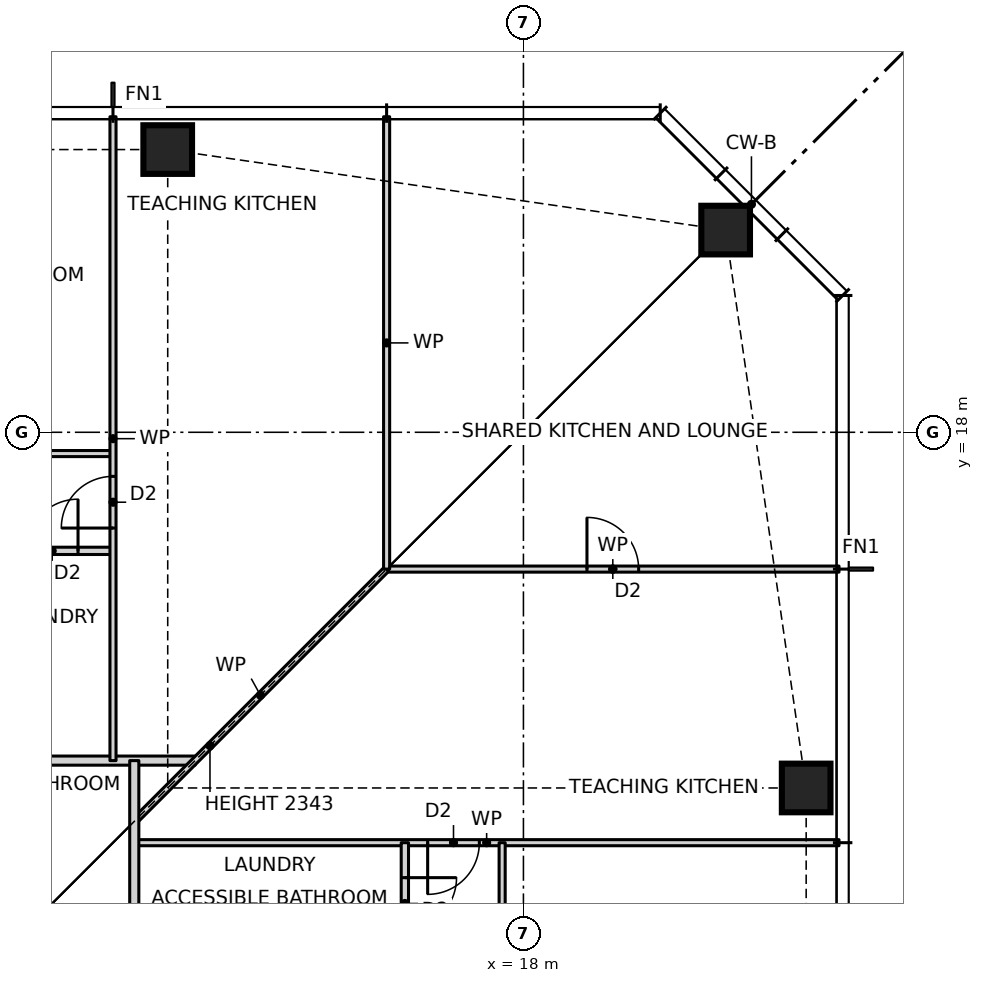
"""IFC4 building model, lengths in metres.
Left out: names, types, materials, properties, quantities, classifications, styles, units other than length and angle.
Written with IfcOpenShell. Run it as: python <this file> out.ifc"""

import sys

from ifc_helpers import new_model, si_unit, direction, frame, frame_2d, origin, origin_2d, place, context, subcontext, project, spatial, rectangle, hollow_rectangle, extrude, element, fill, save


model = new_model("IFC4")
c1 = context("Model", 3, precision=1e-05, world=origin(), true_north=direction((0.0, 1.0)))
c2 = subcontext(c1, "Body", "Model", "MODEL_VIEW")
j1 = project(units=[si_unit("LENGTHUNIT", "METRE"), si_unit("PLANEANGLEUNIT", "RADIAN")], contexts=[c1])
p1 = place(None, origin())
s1 = spatial("IfcSite", under=j1, at=p1, CompositionType="ELEMENT")
p2 = place(p1, origin())
s2 = spatial("IfcBuilding", under=s1, at=p2, CompositionType="ELEMENT")
p3 = place(p2, frame((0.0, 0.0, 57.0)))
s3 = spatial("IfcBuildingStorey", under=s2, at=p3, CompositionType="ELEMENT", Elevation=57.0)
for number, where, z_axis, x_axis in (
    (1, (22.65, 12.15, 0.0), (0.0, 0.0, 1.0), (1.0, 0.0, 0.0)),
    (2, (21.326, 21.326, 0.0), (0.0, 0.0, 1.0), (1.0, 0.0, 0.0)),
    (3, (12.15, 22.65, 0.0), (0.0, 0.0, 1.0), (1.0, 0.0, 0.0)),
):
    element("IfcColumn", number, at=place(p3, frame(where, z_axis=z_axis, x_axis=x_axis)), inside=s3, PredefinedType="COLUMN", context=c2, shape_type="SweptSolid", body=[
        extrude(hollow_rectangle(XDim=0.8, YDim=0.8, WallThickness=0.09, at=origin_2d()), origin(), (0.0, 0.0, 1.0), 3.5),
    ])
p4 = place(p3, frame((11.6, 11.25, 0.0), z_axis=(0.0, 0.0, 1.0), x_axis=(1.0, 0.0, 0.0)))
e4 = element("IfcWall", 4, at=p4, inside=s3, PredefinedType="PARTITIONING", context=c2, shape_type="SweptSolid", body=[
    extrude(rectangle(XDim=11.59, YDim=0.1, at=frame_2d((5.795, 0.0))), origin(), (0.0, 0.0, 1.0), 3.27),
])
p5 = place(p4, frame((4.825, 0.0, 0.0)))
e5 = element("IfcOpeningElement", 5, at=p5, cuts=e4, PredefinedType="OPENING", context=c2, shape_type="SweptSolid", body=[
    extrude(rectangle(XDim=0.85, YDim=2.1, at=frame_2d((0.425, 1.05))), frame((0.0, 0.06, 0.0), z_axis=(0.0, -1.0, 0.0), x_axis=(1.0, 0.0, 0.0)), (0.0, 0.0, 1.0), 0.12),
])
p6 = place(p3, frame((-12.6, 12.6, 0.0), z_axis=(0.0, 0.0, 1.0), x_axis=(1.0, 0.0, 0.0)))
e6 = element("IfcWall", 6, at=p6, inside=s3, PredefinedType="PARTITIONING", context=c2, shape_type="SweptSolid", body=[
    extrude(rectangle(XDim=25.2, YDim=0.15, at=frame_2d((12.6, 0.0))), origin(), (0.0, 0.0, 1.0), 3.27),
])
p7 = place(p6, frame((11.505, 0.0, 0.0)))
e7 = element("IfcOpeningElement", 7, at=p7, cuts=e6, PredefinedType="OPENING", context=c2, shape_type="SweptSolid", body=[
    extrude(rectangle(XDim=1.0, YDim=2.1, at=frame_2d((0.5, 1.05))), frame((0.0, 0.085, 0.0), z_axis=(0.0, -1.0, 0.0), x_axis=(1.0, 0.0, 0.0)), (0.0, 0.0, 1.0), 0.17),
])
p8 = place(p3, frame((15.75, 15.75, 0.0), z_axis=(0.0, 0.0, 1.0), x_axis=(1.0, 0.0, 0.0)))
e8 = element("IfcWall", 8, at=p8, inside=s3, PredefinedType="PARTITIONING", context=c2, shape_type="SweptSolid", body=[
    extrude(rectangle(XDim=7.44, YDim=0.1, at=frame_2d((3.72, 0.0))), origin(), (0.0, 0.0, 1.0), 3.27),
])
p9 = place(p8, frame((3.295, 0.0, 0.0)))
e9 = element("IfcOpeningElement", 9, at=p9, cuts=e8, PredefinedType="OPENING", context=c2, shape_type="SweptSolid", body=[
    extrude(rectangle(XDim=0.85, YDim=2.1, at=frame_2d((0.425, 1.05))), frame((0.0, 0.06, 0.0), z_axis=(0.0, -1.0, 0.0), x_axis=(1.0, 0.0, 0.0)), (0.0, 0.0, 1.0), 0.12),
])
p10 = place(p3, frame((5.65, 16.05, 0.0), z_axis=(0.0, 0.0, 1.0), x_axis=(1.0, 0.0, 0.0)))
e10 = element("IfcWall", 10, at=p10, inside=s3, PredefinedType="PARTITIONING", context=c2, shape_type="SweptSolid", body=[
    extrude(rectangle(XDim=5.6, YDim=0.12, at=frame_2d((2.8, 0.0))), origin(), (0.0, 0.0, 1.0), 3.27),
])
p11 = place(p10, frame((4.175, 0.0, 0.0)))
e11 = element("IfcOpeningElement", 11, at=p11, cuts=e10, PredefinedType="OPENING", context=c2, shape_type="SweptSolid", body=[
    extrude(rectangle(XDim=0.85, YDim=2.1, at=frame_2d((0.425, 1.05))), frame((0.0, 0.07, 0.0), z_axis=(0.0, -1.0, 0.0), x_axis=(1.0, 0.0, 0.0)), (0.0, 0.0, 1.0), 0.14),
])
p12 = place(p10, frame((2.225, 0.0, 0.0)))
e12 = element("IfcOpeningElement", 12, at=p12, cuts=e10, PredefinedType="OPENING", context=c2, shape_type="SweptSolid", body=[
    extrude(rectangle(XDim=0.85, YDim=2.1, at=frame_2d((0.425, 1.05))), frame((0.0, 0.07, 0.0), z_axis=(0.0, -1.0, 0.0), x_axis=(1.0, 0.0, 0.0)), (0.0, 0.0, 1.0), 0.14),
])
p13 = place(p3, frame((-15.75, 17.65, 0.0), z_axis=(0.0, 0.0, 1.0), x_axis=(1.0, 0.0, 0.0)))
e13 = element("IfcWall", 13, at=p13, inside=s3, PredefinedType="PARTITIONING", context=c2, shape_type="SweptSolid", body=[
    extrude(rectangle(XDim=27.0, YDim=0.1, at=frame_2d((13.5, 0.0))), origin(), (0.0, 0.0, 1.0), 3.27),
])
p14 = place(p13, frame((24.3, 0.0, 0.0)))
e14 = element("IfcOpeningElement", 14, at=p14, cuts=e13, PredefinedType="OPENING", context=c2, shape_type="SweptSolid", body=[
    extrude(rectangle(XDim=0.9, YDim=2.1, at=frame_2d((0.45, 1.05))), frame((0.0, 0.06, 0.0), z_axis=(0.0, -1.0, 0.0), x_axis=(1.0, 0.0, 0.0)), (0.0, 0.0, 1.0), 0.12),
])
p15 = place(p13, frame((19.8, 0.0, 0.0)))
e15 = element("IfcOpeningElement", 15, at=p15, cuts=e13, PredefinedType="OPENING", context=c2, shape_type="SweptSolid", body=[
    extrude(rectangle(XDim=0.9, YDim=2.1, at=frame_2d((0.45, 1.05))), frame((0.0, 0.06, 0.0), z_axis=(0.0, -1.0, 0.0), x_axis=(1.0, 0.0, 0.0)), (0.0, 0.0, 1.0), 0.12),
])
p16 = place(p13, frame((15.3, 0.0, 0.0)))
e16 = element("IfcOpeningElement", 16, at=p16, cuts=e13, PredefinedType="OPENING", context=c2, shape_type="SweptSolid", body=[
    extrude(rectangle(XDim=0.9, YDim=2.1, at=frame_2d((0.45, 1.05))), frame((0.0, 0.06, 0.0), z_axis=(0.0, -1.0, 0.0), x_axis=(1.0, 0.0, 0.0)), (0.0, 0.0, 1.0), 0.12),
])
p17 = place(p13, frame((10.8, 0.0, 0.0)))
e17 = element("IfcOpeningElement", 17, at=p17, cuts=e13, PredefinedType="OPENING", context=c2, shape_type="SweptSolid", body=[
    extrude(rectangle(XDim=0.9, YDim=2.1, at=frame_2d((0.45, 1.05))), frame((0.0, 0.06, 0.0), z_axis=(0.0, -1.0, 0.0), x_axis=(1.0, 0.0, 0.0)), (0.0, 0.0, 1.0), 0.12),
])
p18 = place(p13, frame((6.3, 0.0, 0.0)))
e18 = element("IfcOpeningElement", 18, at=p18, cuts=e13, PredefinedType="OPENING", context=c2, shape_type="SweptSolid", body=[
    extrude(rectangle(XDim=0.9, YDim=2.1, at=frame_2d((0.45, 1.05))), frame((0.0, 0.06, 0.0), z_axis=(0.0, -1.0, 0.0), x_axis=(1.0, 0.0, 0.0)), (0.0, 0.0, 1.0), 0.12),
])
p19 = place(p13, frame((1.8, 0.0, 0.0)))
e19 = element("IfcOpeningElement", 19, at=p19, cuts=e13, PredefinedType="OPENING", context=c2, shape_type="SweptSolid", body=[
    extrude(rectangle(XDim=0.9, YDim=2.1, at=frame_2d((0.45, 1.05))), frame((0.0, 0.06, 0.0), z_axis=(0.0, -1.0, 0.0), x_axis=(1.0, 0.0, 0.0)), (0.0, 0.0, 1.0), 0.12),
])
p20 = place(p3, frame((11.6, 11.6, 0.0), z_axis=(0.0, 0.0, 1.0), x_axis=(0.707106781187, 0.707106781187, 0.0)))
e20 = element("IfcWall", 20, at=p20, inside=s3, PredefinedType="PARTITIONING", context=c2, shape_type="SweptSolid", body=[
    extrude(rectangle(XDim=5.869, YDim=0.1, at=frame_2d((2.935, 0.0))), origin(), (0.0, 0.0, 1.0), 2.343),
])
p21 = place(p3, frame((17.65, -15.75, 0.0), z_axis=(0.0, 0.0, 1.0), x_axis=(0.0, 1.0, 0.0)))
e21 = element("IfcWall", 21, at=p21, inside=s3, PredefinedType="PARTITIONING", context=c2, shape_type="SweptSolid", body=[
    extrude(rectangle(XDim=27.0, YDim=0.1, at=frame_2d((13.5, 0.0))), origin(), (0.0, 0.0, 1.0), 3.27),
])
p22 = place(p21, frame((1.8, 0.0, 0.0)))
e22 = element("IfcOpeningElement", 22, at=p22, cuts=e21, PredefinedType="OPENING", context=c2, shape_type="SweptSolid", body=[
    extrude(rectangle(XDim=0.9, YDim=2.1, at=frame_2d((0.45, 1.05))), frame((0.0, 0.06, 0.0), z_axis=(0.0, -1.0, 0.0), x_axis=(1.0, 0.0, 0.0)), (0.0, 0.0, 1.0), 0.12),
])
p23 = place(p21, frame((6.3, 0.0, 0.0)))
e23 = element("IfcOpeningElement", 23, at=p23, cuts=e21, PredefinedType="OPENING", context=c2, shape_type="SweptSolid", body=[
    extrude(rectangle(XDim=0.9, YDim=2.1, at=frame_2d((0.45, 1.05))), frame((0.0, 0.06, 0.0), z_axis=(0.0, -1.0, 0.0), x_axis=(1.0, 0.0, 0.0)), (0.0, 0.0, 1.0), 0.12),
])
p24 = place(p21, frame((10.8, 0.0, 0.0)))
e24 = element("IfcOpeningElement", 24, at=p24, cuts=e21, PredefinedType="OPENING", context=c2, shape_type="SweptSolid", body=[
    extrude(rectangle(XDim=0.9, YDim=2.1, at=frame_2d((0.45, 1.05))), frame((0.0, 0.06, 0.0), z_axis=(0.0, -1.0, 0.0), x_axis=(1.0, 0.0, 0.0)), (0.0, 0.0, 1.0), 0.12),
])
p25 = place(p21, frame((15.3, 0.0, 0.0)))
e25 = element("IfcOpeningElement", 25, at=p25, cuts=e21, PredefinedType="OPENING", context=c2, shape_type="SweptSolid", body=[
    extrude(rectangle(XDim=0.9, YDim=2.1, at=frame_2d((0.45, 1.05))), frame((0.0, 0.06, 0.0), z_axis=(0.0, -1.0, 0.0), x_axis=(1.0, 0.0, 0.0)), (0.0, 0.0, 1.0), 0.12),
])
p26 = place(p21, frame((19.8, 0.0, 0.0)))
e26 = element("IfcOpeningElement", 26, at=p26, cuts=e21, PredefinedType="OPENING", context=c2, shape_type="SweptSolid", body=[
    extrude(rectangle(XDim=0.9, YDim=2.1, at=frame_2d((0.45, 1.05))), frame((0.0, 0.06, 0.0), z_axis=(0.0, -1.0, 0.0), x_axis=(1.0, 0.0, 0.0)), (0.0, 0.0, 1.0), 0.12),
])
p27 = place(p21, frame((24.3, 0.0, 0.0)))
e27 = element("IfcOpeningElement", 27, at=p27, cuts=e21, PredefinedType="OPENING", context=c2, shape_type="SweptSolid", body=[
    extrude(rectangle(XDim=0.9, YDim=2.1, at=frame_2d((0.45, 1.05))), frame((0.0, 0.06, 0.0), z_axis=(0.0, -1.0, 0.0), x_axis=(1.0, 0.0, 0.0)), (0.0, 0.0, 1.0), 0.12),
])
p28 = place(p3, frame((16.05, 6.15, 0.0), z_axis=(0.0, 0.0, 1.0), x_axis=(0.0, 1.0, 0.0)))
e28 = element("IfcWall", 28, at=p28, inside=s3, PredefinedType="PARTITIONING", context=c2, shape_type="SweptSolid", body=[
    extrude(rectangle(XDim=5.1, YDim=0.12, at=frame_2d((2.55, 0.0))), origin(), (0.0, 0.0, 1.0), 3.27),
])
p29 = place(p28, frame((1.875, 0.0, 0.0)))
e29 = element("IfcOpeningElement", 29, at=p29, cuts=e28, PredefinedType="OPENING", context=c2, shape_type="SweptSolid", body=[
    extrude(rectangle(XDim=0.85, YDim=2.1, at=frame_2d((0.425, 1.05))), frame((0.0, 0.07, 0.0), z_axis=(0.0, -1.0, 0.0), x_axis=(1.0, 0.0, 0.0)), (0.0, 0.0, 1.0), 0.14),
])
p30 = place(p28, frame((3.675, 0.0, 0.0)))
e30 = element("IfcOpeningElement", 30, at=p30, cuts=e28, PredefinedType="OPENING", context=c2, shape_type="SweptSolid", body=[
    extrude(rectangle(XDim=0.85, YDim=2.1, at=frame_2d((0.425, 1.05))), frame((0.0, 0.07, 0.0), z_axis=(0.0, -1.0, 0.0), x_axis=(1.0, 0.0, 0.0)), (0.0, 0.0, 1.0), 0.14),
])
p31 = place(p3, frame((15.75, 15.75, 0.0), z_axis=(0.0, 0.0, 1.0), x_axis=(0.0, 1.0, 0.0)))
e31 = element("IfcWall", 31, at=p31, inside=s3, PredefinedType="PARTITIONING", context=c2, shape_type="SweptSolid", body=[
    extrude(rectangle(XDim=7.44, YDim=0.1, at=frame_2d((3.72, 0.0))), origin(), (0.0, 0.0, 1.0), 3.27),
])
p32 = place(p3, frame((11.6, -11.6, 0.0), z_axis=(0.0, 0.0, 1.0), x_axis=(0.0, 1.0, 0.0)))
e32 = element("IfcWall", 32, at=p32, inside=s3, PredefinedType="PARTITIONING", context=c2, shape_type="SweptSolid", body=[
    extrude(rectangle(XDim=24.2, YDim=0.15, at=frame_2d((12.1, 0.0))), origin(), (0.0, 0.0, 1.0), 3.27),
])
p33 = place(p32, frame((16.05, 0.0, 0.0)))
e33 = element("IfcOpeningElement", 33, at=p33, cuts=e32, PredefinedType="OPENING", context=c2, shape_type="SweptSolid", body=[
    extrude(rectangle(XDim=1.0, YDim=2.1, at=frame_2d((0.5, 1.05))), frame((0.0, 0.085, 0.0), z_axis=(0.0, -1.0, 0.0), x_axis=(1.0, 0.0, 0.0)), (0.0, 0.0, 1.0), 0.17),
])
p34 = place(p3, frame((11.25, 12.6, 0.0), z_axis=(0.0, 0.0, 1.0), x_axis=(0.0, 1.0, 0.0)))
e34 = element("IfcWall", 34, at=p34, inside=s3, PredefinedType="PARTITIONING", context=c2, shape_type="SweptSolid", body=[
    extrude(rectangle(XDim=10.59, YDim=0.1, at=frame_2d((5.295, 0.0))), origin(), (0.0, 0.0, 1.0), 3.27),
])
p35 = place(p34, frame((3.825, 0.0, 0.0)))
e35 = element("IfcOpeningElement", 35, at=p35, cuts=e34, PredefinedType="OPENING", context=c2, shape_type="SweptSolid", body=[
    extrude(rectangle(XDim=0.85, YDim=2.1, at=frame_2d((0.425, 1.05))), frame((0.0, 0.06, 0.0), z_axis=(0.0, -1.0, 0.0), x_axis=(1.0, 0.0, 0.0)), (0.0, 0.0, 1.0), 0.12),
])
p36 = place(p30, frame((0.85, 0.0, 0.0), z_axis=(0.0, 0.0, 1.0), x_axis=(-1.0, 0.0, 0.0)))
e36 = element("IfcDoor", 36, at=p36, inside=s3, OperationType="SINGLE_SWING_LEFT", PredefinedType="DOOR", context=c2, shape_type="SweptSolid", body=[
    extrude(rectangle(XDim=0.85, YDim=2.1, at=frame_2d((0.425, 1.05))), frame((0.0, 0.025, 0.0), z_axis=(0.0, -1.0, 0.0), x_axis=(1.0, 0.0, 0.0)), (0.0, 0.0, 1.0), 0.05),
])
fill(e30, e36)
p37 = place(p5, frame((0.85, 0.0, 0.0), z_axis=(0.0, 0.0, 1.0), x_axis=(-1.0, 0.0, 0.0)))
e37 = element("IfcDoor", 37, at=p37, inside=s3, OperationType="SINGLE_SWING_RIGHT", PredefinedType="DOOR", context=c2, shape_type="SweptSolid", body=[
    extrude(rectangle(XDim=0.85, YDim=2.1, at=frame_2d((0.425, 1.05))), frame((0.0, 0.025, 0.0), z_axis=(0.0, -1.0, 0.0), x_axis=(1.0, 0.0, 0.0)), (0.0, 0.0, 1.0), 0.05),
])
fill(e5, e37)
p38 = place(p35, origin())
e38 = element("IfcDoor", 38, at=p38, inside=s3, OperationType="SINGLE_SWING_LEFT", PredefinedType="DOOR", context=c2, shape_type="SweptSolid", body=[
    extrude(rectangle(XDim=0.85, YDim=2.1, at=frame_2d((0.425, 1.05))), frame((0.0, 0.025, 0.0), z_axis=(0.0, -1.0, 0.0), x_axis=(1.0, 0.0, 0.0)), (0.0, 0.0, 1.0), 0.05),
])
fill(e35, e38)
p39 = place(p11, origin())
e39 = element("IfcDoor", 39, at=p39, inside=s3, OperationType="SINGLE_SWING_RIGHT", PredefinedType="DOOR", context=c2, shape_type="SweptSolid", body=[
    extrude(rectangle(XDim=0.85, YDim=2.1, at=frame_2d((0.425, 1.05))), frame((0.0, 0.025, 0.0), z_axis=(0.0, -1.0, 0.0), x_axis=(1.0, 0.0, 0.0)), (0.0, 0.0, 1.0), 0.05),
])
fill(e11, e39)
p40 = place(p9, origin())
e40 = element("IfcDoor", 40, at=p40, inside=s3, OperationType="SINGLE_SWING_LEFT", PredefinedType="DOOR", context=c2, shape_type="SweptSolid", body=[
    extrude(rectangle(XDim=0.85, YDim=2.1, at=frame_2d((0.425, 1.05))), frame((0.0, 0.025, 0.0), z_axis=(0.0, -1.0, 0.0), x_axis=(1.0, 0.0, 0.0)), (0.0, 0.0, 1.0), 0.05),
])
fill(e9, e40)
save(model, sys.argv[1])
